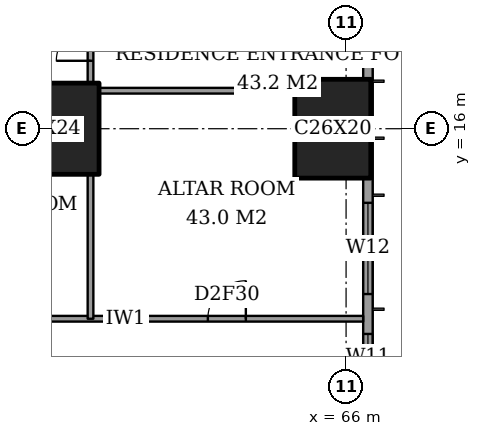
"""IFC4 building model, lengths in metres.
Left out: names, types, materials, properties, quantities, classifications, styles, units other than length and angle.
Written with IfcOpenShell. Run it as: python <this file> out.ifc"""

import sys

from ifc_helpers import new_model, si_unit, direction, frame, frame_2d, origin, origin_2d, place, context, subcontext, project, spatial, rectangle, extrude, element, fill, save


model = new_model("IFC4")
c1 = context("Model", 3, precision=1e-05, world=origin(), true_north=direction((0.0, 1.0)))
c2 = subcontext(c1, "Body", "Model", "MODEL_VIEW")
j1 = project(units=[si_unit("LENGTHUNIT", "METRE"), si_unit("PLANEANGLEUNIT", "RADIAN")], contexts=[c1])
p1 = place(None, origin())
s1 = spatial("IfcSite", under=j1, at=p1, CompositionType="ELEMENT")
p2 = place(p1, origin())
s2 = spatial("IfcBuilding", under=s1, at=p2, CompositionType="ELEMENT")
p3 = place(p2, frame((0.0, 0.0, 157.4)))
s3 = spatial("IfcBuildingStorey", under=s2, at=p3, CompositionType="ELEMENT", Elevation=157.4)
p4 = place(p3, frame((58.0, 16.0, 0.0), z_axis=(0.0, 0.0, 1.0), x_axis=(1.0, 0.0, 0.0)))
e1 = element("IfcColumn", 1, at=p4, inside=s3, PredefinedType="COLUMN", context=c2, shape_type="SweptSolid", body=[
    extrude(rectangle(XDim=3.0, YDim=2.4, at=origin_2d()), origin(), (0.0, 0.0, 1.0), 3.6),
])
p5 = place(p3, frame((65.65, 16.0, 0.0), z_axis=(0.0, 0.0, 1.0), x_axis=(0.0, 1.0, 0.0)))
e2 = element("IfcColumn", 2, at=p5, inside=s3, PredefinedType="COLUMN", context=c2, shape_type="SweptSolid", body=[
    extrude(rectangle(XDim=2.6, YDim=2.0, at=origin_2d()), origin(), (0.0, 0.0, 1.0), 3.6),
])
p6 = place(p3, frame((66.575, 3.175, 0.0), z_axis=(0.0, 0.0, 1.0), x_axis=(0.0, 1.0, 0.0)))
e3 = element("IfcWall", 3, at=p6, inside=s3, PredefinedType="SOLIDWALL", context=c2, shape_type="SweptSolid", body=[
    extrude(rectangle(XDim=41.65, YDim=0.25, at=frame_2d((20.825, 0.0))), origin(), (0.0, 0.0, 1.0), 3.6),
])
p7 = place(p6, frame((0.775, 0.0, 0.4)))
e4 = element("IfcOpeningElement", 4, at=p7, cuts=e3, PredefinedType="OPENING", context=c2, shape_type="SweptSolid", body=[
    extrude(rectangle(XDim=2.4, YDim=2.2, at=frame_2d((1.2, 1.1))), frame((0.0, 0.135, 0.0), z_axis=(0.0, -1.0, 0.0), x_axis=(1.0, 0.0, 0.0)), (0.0, 0.0, 1.0), 0.27),
])
p8 = place(p6, frame((6.225, 0.0, 0.4)))
e5 = element("IfcOpeningElement", 5, at=p8, cuts=e3, PredefinedType="OPENING", context=c2, shape_type="SweptSolid", body=[
    extrude(rectangle(XDim=1.2, YDim=2.2, at=frame_2d((0.6, 1.1))), frame((0.0, 0.135, 0.0), z_axis=(0.0, -1.0, 0.0), x_axis=(1.0, 0.0, 0.0)), (0.0, 0.0, 1.0), 0.27),
])
p9 = place(p6, frame((8.475, 0.0, 0.4)))
e6 = element("IfcOpeningElement", 6, at=p9, cuts=e3, PredefinedType="OPENING", context=c2, shape_type="SweptSolid", body=[
    extrude(rectangle(XDim=2.4, YDim=2.2, at=frame_2d((1.2, 1.1))), frame((0.0, 0.135, 0.0), z_axis=(0.0, -1.0, 0.0), x_axis=(1.0, 0.0, 0.0)), (0.0, 0.0, 1.0), 0.27),
])
p10 = place(p6, frame((15.775, 0.0, 0.4)))
e7 = element("IfcOpeningElement", 7, at=p10, cuts=e3, PredefinedType="OPENING", context=c2, shape_type="SweptSolid", body=[
    extrude(rectangle(XDim=2.4, YDim=2.2, at=frame_2d((1.2, 1.1))), frame((0.0, 0.135, 0.0), z_axis=(0.0, -1.0, 0.0), x_axis=(1.0, 0.0, 0.0)), (0.0, 0.0, 1.0), 0.27),
])
p11 = place(p6, frame((23.475, 0.0, 0.4)))
e8 = element("IfcOpeningElement", 8, at=p11, cuts=e3, PredefinedType="OPENING", context=c2, shape_type="SweptSolid", body=[
    extrude(rectangle(XDim=2.4, YDim=2.2, at=frame_2d((1.2, 1.1))), frame((0.0, 0.135, 0.0), z_axis=(0.0, -1.0, 0.0), x_axis=(1.0, 0.0, 0.0)), (0.0, 0.0, 1.0), 0.27),
])
p12 = place(p6, frame((30.975, 0.0, 0.4)))
e9 = element("IfcOpeningElement", 9, at=p12, cuts=e3, PredefinedType="OPENING", context=c2, shape_type="SweptSolid", body=[
    extrude(rectangle(XDim=2.4, YDim=2.2, at=frame_2d((1.2, 1.1))), frame((0.0, 0.135, 0.0), z_axis=(0.0, -1.0, 0.0), x_axis=(1.0, 0.0, 0.0)), (0.0, 0.0, 1.0), 0.27),
])
p13 = place(p6, frame((34.5, 0.0, 0.4)))
e10 = element("IfcOpeningElement", 10, at=p13, cuts=e3, PredefinedType="OPENING", context=c2, shape_type="SweptSolid", body=[
    extrude(rectangle(XDim=1.2, YDim=2.2, at=frame_2d((0.6, 1.1))), frame((0.0, 0.135, 0.0), z_axis=(0.0, -1.0, 0.0), x_axis=(1.0, 0.0, 0.0)), (0.0, 0.0, 1.0), 0.27),
])
p14 = place(p6, frame((38.475, 0.0, 0.4)))
e11 = element("IfcOpeningElement", 11, at=p14, cuts=e3, PredefinedType="OPENING", context=c2, shape_type="SweptSolid", body=[
    extrude(rectangle(XDim=2.4, YDim=2.2, at=frame_2d((1.2, 1.1))), frame((0.0, 0.135, 0.0), z_axis=(0.0, -1.0, 0.0), x_axis=(1.0, 0.0, 0.0)), (0.0, 0.0, 1.0), 0.27),
])
p15 = place(p3, frame((41.439, 11.0, 0.0), z_axis=(0.0, 0.0, 1.0), x_axis=(1.0, 0.0, 0.0)))
e12 = element("IfcWall", 12, at=p15, inside=s3, PredefinedType="PARTITIONING", context=c2, shape_type="SweptSolid", body=[
    extrude(rectangle(XDim=25.011, YDim=0.15, at=frame_2d((12.505, 0.0))), origin(), (0.0, 0.0, 1.0), 3.35),
])
p16 = place(p15, frame((12.361, 0.0, 0.0)))
e13 = element("IfcOpeningElement", 13, at=p16, cuts=e12, PredefinedType="OPENING", context=c2, shape_type="SweptSolid", body=[
    extrude(rectangle(XDim=1.0, YDim=2.1, at=frame_2d((0.5, 1.05))), frame((0.0, 0.085, 0.0), z_axis=(0.0, -1.0, 0.0), x_axis=(1.0, 0.0, 0.0)), (0.0, 0.0, 1.0), 0.17),
])
p17 = place(p15, frame((20.924, 0.0, 0.0)))
e14 = element("IfcOpeningElement", 14, at=p17, cuts=e12, PredefinedType="OPENING", context=c2, shape_type="SweptSolid", body=[
    extrude(rectangle(XDim=1.0, YDim=2.1, at=frame_2d((0.5, 1.05))), frame((0.0, 0.085, 0.0), z_axis=(0.0, -1.0, 0.0), x_axis=(1.0, 0.0, 0.0)), (0.0, 0.0, 1.0), 0.17),
])
p18 = place(p15, frame((15.448, 0.0, 0.0)))
e15 = element("IfcOpeningElement", 15, at=p18, cuts=e12, PredefinedType="OPENING", context=c2, shape_type="SweptSolid", body=[
    extrude(rectangle(XDim=0.9, YDim=2.1, at=frame_2d((0.45, 1.05))), frame((0.0, 0.085, 0.0), z_axis=(0.0, -1.0, 0.0), x_axis=(1.0, 0.0, 0.0)), (0.0, 0.0, 1.0), 0.17),
])
p19 = place(p15, frame((9.961, 0.0, 0.0)))
e16 = element("IfcOpeningElement", 16, at=p19, cuts=e12, PredefinedType="OPENING", context=c2, shape_type="SweptSolid", body=[
    extrude(rectangle(XDim=1.0, YDim=2.1, at=frame_2d((0.5, 1.05))), frame((0.0, 0.085, 0.0), z_axis=(0.0, -1.0, 0.0), x_axis=(1.0, 0.0, 0.0)), (0.0, 0.0, 1.0), 0.17),
])
p20 = place(p15, frame((7.411, 0.0, 0.0)))
e17 = element("IfcOpeningElement", 17, at=p20, cuts=e12, PredefinedType="OPENING", context=c2, shape_type="SweptSolid", body=[
    extrude(rectangle(XDim=0.9, YDim=2.1, at=frame_2d((0.45, 1.05))), frame((0.0, 0.085, 0.0), z_axis=(0.0, -1.0, 0.0), x_axis=(1.0, 0.0, 0.0)), (0.0, 0.0, 1.0), 0.17),
])
p21 = place(p15, frame((2.836, 0.0, 0.0)))
e18 = element("IfcOpeningElement", 18, at=p21, cuts=e12, PredefinedType="OPENING", context=c2, shape_type="SweptSolid", body=[
    extrude(rectangle(XDim=1.0, YDim=2.1, at=frame_2d((0.5, 1.05))), frame((0.0, 0.085, 0.0), z_axis=(0.0, -1.0, 0.0), x_axis=(1.0, 0.0, 0.0)), (0.0, 0.0, 1.0), 0.17),
])
p22 = place(p3, frame((59.5, 17.0, 0.0), z_axis=(0.0, 0.0, 1.0), x_axis=(1.0, 0.0, 0.0)))
e19 = element("IfcWall", 19, at=p22, inside=s3, PredefinedType="PARTITIONING", context=c2, shape_type="SweptSolid", body=[
    extrude(rectangle(XDim=5.15, YDim=0.15, at=frame_2d((2.575, 0.0))), origin(), (0.0, 0.0, 1.0), 3.35),
])
p23 = place(p3, frame((59.275, 11.0, 0.0), z_axis=(0.0, 0.0, 1.0), x_axis=(0.0, 1.0, 0.0)))
e20 = element("IfcWall", 20, at=p23, inside=s3, PredefinedType="PARTITIONING", context=c2, shape_type="SweptSolid", body=[
    extrude(rectangle(XDim=3.8, YDim=0.15, at=frame_2d((1.9, 0.0))), origin(), (0.0, 0.0, 1.0), 3.35),
])
p24 = place(p3, frame((59.275, 17.2, 0.0), z_axis=(0.0, 0.0, 1.0), x_axis=(0.0, 1.0, 0.0)))
e21 = element("IfcWall", 21, at=p24, inside=s3, PredefinedType="PARTITIONING", context=c2, shape_type="SweptSolid", body=[
    extrude(rectangle(XDim=2.45, YDim=0.15, at=frame_2d((1.225, 0.0))), origin(), (0.0, 0.0, 1.0), 3.35),
])
p25 = place(p24, frame((0.587, 0.0, 0.0)))
e22 = element("IfcOpeningElement", 22, at=p25, cuts=e21, PredefinedType="OPENING", context=c2, shape_type="SweptSolid", body=[
    extrude(rectangle(XDim=0.9, YDim=2.1, at=frame_2d((0.45, 1.05))), frame((0.0, 0.085, 0.0), z_axis=(0.0, -1.0, 0.0), x_axis=(1.0, 0.0, 0.0)), (0.0, 0.0, 1.0), 0.17),
])
p26 = place(p8, origin())
e23 = element("IfcWindow", 23, at=p26, inside=s3, PartitioningType="SINGLE_PANEL", PredefinedType="WINDOW", context=c2, shape_type="SweptSolid", body=[
    extrude(rectangle(XDim=1.2, YDim=2.2, at=frame_2d((0.6, 1.1))), frame((0.0, 0.03, 0.0), z_axis=(0.0, -1.0, 0.0), x_axis=(1.0, 0.0, 0.0)), (0.0, 0.0, 1.0), 0.06),
])
fill(e5, e23)
p27 = place(p9, origin())
e24 = element("IfcWindow", 24, at=p27, inside=s3, PartitioningType="SINGLE_PANEL", PredefinedType="WINDOW", context=c2, shape_type="SweptSolid", body=[
    extrude(rectangle(XDim=2.4, YDim=2.2, at=frame_2d((1.2, 1.1))), frame((0.0, 0.03, 0.0), z_axis=(0.0, -1.0, 0.0), x_axis=(1.0, 0.0, 0.0)), (0.0, 0.0, 1.0), 0.06),
])
fill(e6, e24)
p28 = place(p17, origin())
e25 = element("IfcDoor", 25, at=p28, inside=s3, OperationType="SINGLE_SWING_LEFT", PredefinedType="DOOR", context=c2, shape_type="SweptSolid", body=[
    extrude(rectangle(XDim=1.0, YDim=2.1, at=frame_2d((0.5, 1.05))), frame((0.0, 0.025, 0.0), z_axis=(0.0, -1.0, 0.0), x_axis=(1.0, 0.0, 0.0)), (0.0, 0.0, 1.0), 0.05),
])
fill(e14, e25)
p29 = place(p25, origin())
e26 = element("IfcDoor", 26, at=p29, inside=s3, OperationType="SINGLE_SWING_RIGHT", PredefinedType="DOOR", context=c2, shape_type="SweptSolid", body=[
    extrude(rectangle(XDim=0.9, YDim=2.1, at=frame_2d((0.45, 1.05))), frame((0.0, 0.025, 0.0), z_axis=(0.0, -1.0, 0.0), x_axis=(1.0, 0.0, 0.0)), (0.0, 0.0, 1.0), 0.05),
])
fill(e22, e26)
save(model, sys.argv[1])
